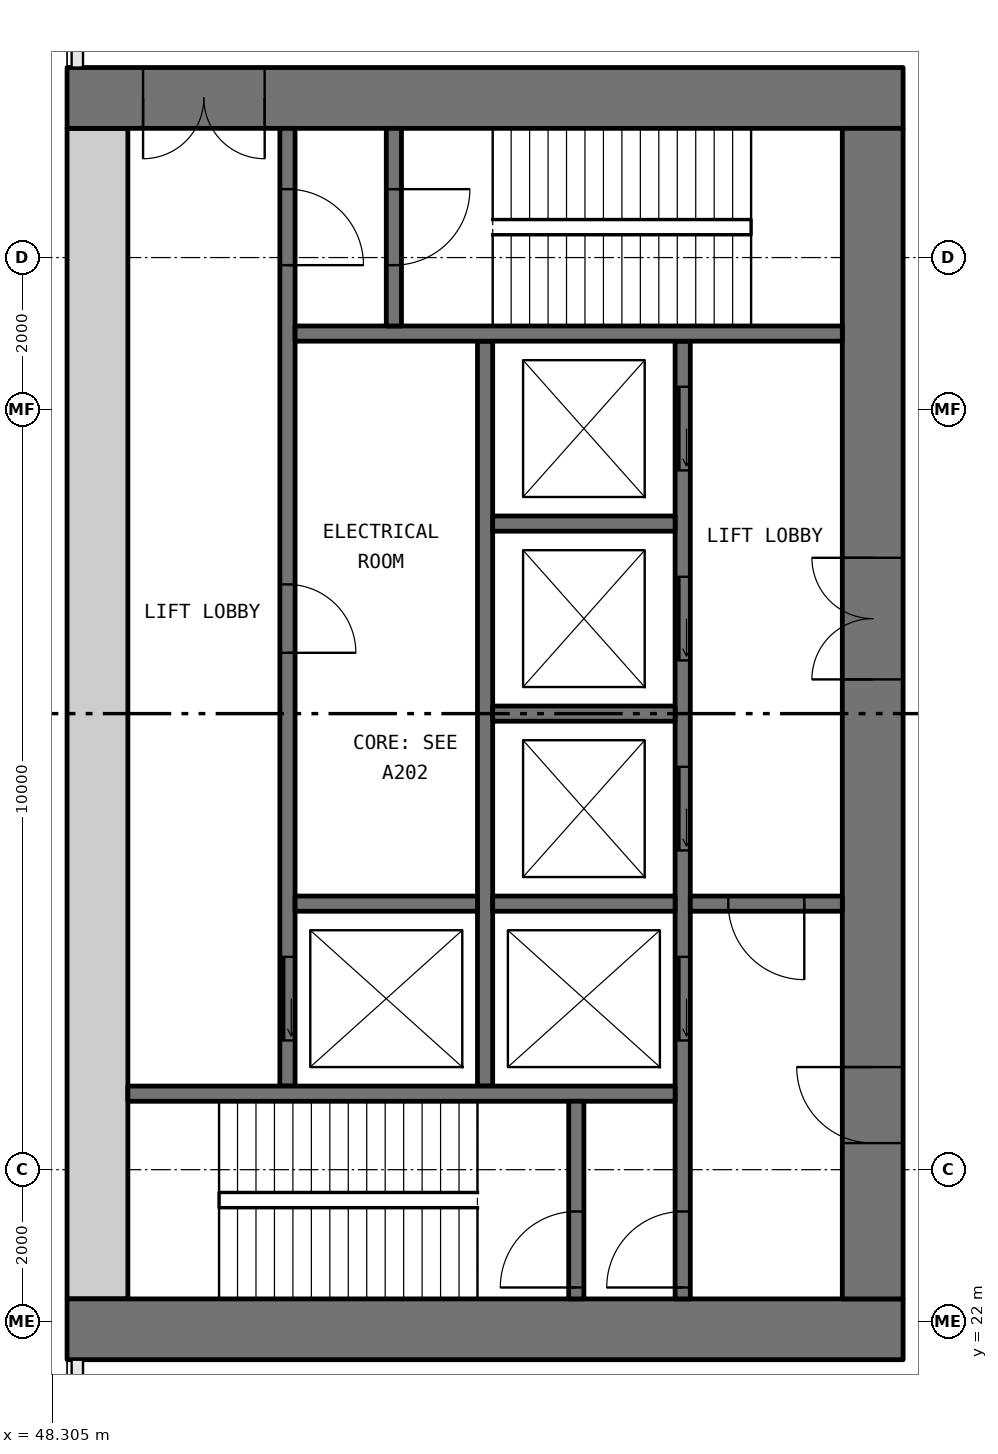
"""IFC4 building model, lengths in metres.
Left out: names, types, materials, properties, quantities, classifications, styles, units other than length and angle.
Written with IfcOpenShell. Run it as: python <this file> out.ifc"""

import sys

from ifc_helpers import new_model, si_unit, direction, frame, frame_2d, origin, place, context, subcontext, project, spatial, rectangle, extrude, element, fill, save


model = new_model("IFC4")
c1 = context("Model", 3, precision=1e-05, world=origin(), true_north=direction((0.0, 1.0)))
c2 = subcontext(c1, "Body", "Model", "MODEL_VIEW")
j1 = project(units=[si_unit("LENGTHUNIT", "METRE"), si_unit("PLANEANGLEUNIT", "RADIAN")], contexts=[c1])
p1 = place(None, origin())
s1 = spatial("IfcSite", under=j1, at=p1, CompositionType="ELEMENT")
p2 = place(p1, origin())
s2 = spatial("IfcBuilding", under=s1, at=p2, CompositionType="ELEMENT")
p3 = place(p2, frame((0.0, 0.0, 6.0)))
s3 = spatial("IfcBuildingStorey", under=s2, at=p3, CompositionType="ELEMENT", Elevation=6.0)
p4 = place(p3, frame((59.5, 21.9, 0.0), z_axis=(0.0, 0.0, 1.0), x_axis=(-1.0, 0.0, 0.0)))
e1 = element("IfcWall", 1, at=p4, inside=s3, PredefinedType="SHEAR", context=c2, shape_type="SweptSolid", body=[
    extrude(rectangle(XDim=11.0, YDim=0.8, at=frame_2d((5.5, 0.0))), origin(), (0.0, 0.0, 1.0), 5.6),
])
p5 = place(p3, frame((59.5, 38.1, 0.0), z_axis=(0.0, 0.0, 1.0), x_axis=(-1.0, 0.0, 0.0)))
e2 = element("IfcWall", 2, at=p5, inside=s3, PredefinedType="SHEAR", context=c2, shape_type="SweptSolid", body=[
    extrude(rectangle(XDim=11.0, YDim=0.8, at=frame_2d((5.5, 0.0))), origin(), (0.0, 0.0, 1.0), 5.6),
])
p6 = place(p5, frame((8.4, 0.0, 0.0)))
e3 = element("IfcOpeningElement", 3, at=p6, cuts=e2, PredefinedType="OPENING", context=c2, shape_type="SweptSolid", body=[
    extrude(rectangle(XDim=1.6, YDim=2.1, at=frame_2d((0.8, 1.05))), frame((0.0, 0.41, 0.0), z_axis=(0.0, -1.0, 0.0), x_axis=(1.0, 0.0, 0.0)), (0.0, 0.0, 1.0), 0.82),
])
p7 = place(p3, frame((59.1, 22.3, 0.0), z_axis=(0.0, 0.0, 1.0), x_axis=(0.0, 1.0, 0.0)))
e4 = element("IfcWall", 4, at=p7, inside=s3, PredefinedType="SHEAR", context=c2, shape_type="SweptSolid", body=[
    extrude(rectangle(XDim=15.4, YDim=0.8, at=frame_2d((7.7, 0.0))), origin(), (0.0, 0.0, 1.0), 5.6),
])
p8 = place(p7, frame((8.15, 0.0, 0.0)))
e5 = element("IfcOpeningElement", 5, at=p8, cuts=e4, PredefinedType="OPENING", context=c2, shape_type="SweptSolid", body=[
    extrude(rectangle(XDim=1.6, YDim=2.1, at=frame_2d((0.8, 1.05))), frame((0.0, 0.41, 0.0), z_axis=(0.0, -1.0, 0.0), x_axis=(1.0, 0.0, 0.0)), (0.0, 0.0, 1.0), 0.82),
])
p9 = place(p7, frame((2.05, 0.0, 0.0)))
e6 = element("IfcOpeningElement", 6, at=p9, cuts=e4, PredefinedType="OPENING", context=c2, shape_type="SweptSolid", body=[
    extrude(rectangle(XDim=1.0, YDim=2.1, at=frame_2d((0.5, 1.05))), frame((0.0, 0.41, 0.0), z_axis=(0.0, -1.0, 0.0), x_axis=(1.0, 0.0, 0.0)), (0.0, 0.0, 1.0), 0.82),
])
p10 = place(p3, frame((48.9, 22.3, 0.0), z_axis=(0.0, 0.0, 1.0), x_axis=(0.0, 1.0, 0.0)))
e7 = element("IfcWall", 7, at=p10, inside=s3, PredefinedType="SHEAR", context=c2, shape_type="SweptSolid", body=[
    extrude(rectangle(XDim=15.4, YDim=0.8, at=frame_2d((7.7, 0.0))), origin(), (0.0, 0.0, 1.0), 5.6),
])
p11 = place(p3, frame((56.6, 22.3, 0.0), z_axis=(0.0, 0.0, 1.0), x_axis=(0.0, 1.0, 0.0)))
e8 = element("IfcWall", 8, at=p11, inside=s3, PredefinedType="SOLIDWALL", context=c2, shape_type="SweptSolid", body=[
    extrude(rectangle(XDim=12.6, YDim=0.2, at=frame_2d((6.3, 0.0))), origin(), (0.0, 0.0, 1.0), 5.6),
])
p12 = place(p11, frame((3.4, 0.0, 0.0)))
e9 = element("IfcOpeningElement", 9, at=p12, cuts=e8, PredefinedType="OPENING", context=c2, shape_type="SweptSolid", body=[
    extrude(rectangle(XDim=1.1, YDim=2.1, at=frame_2d((0.55, 1.05))), frame((0.0, 0.11, 0.0), z_axis=(0.0, -1.0, 0.0), x_axis=(1.0, 0.0, 0.0)), (0.0, 0.0, 1.0), 0.22),
])
p13 = place(p11, frame((5.9, 0.0, 0.0)))
e10 = element("IfcOpeningElement", 10, at=p13, cuts=e8, PredefinedType="OPENING", context=c2, shape_type="SweptSolid", body=[
    extrude(rectangle(XDim=1.1, YDim=2.1, at=frame_2d((0.55, 1.05))), frame((0.0, 0.11, 0.0), z_axis=(0.0, -1.0, 0.0), x_axis=(1.0, 0.0, 0.0)), (0.0, 0.0, 1.0), 0.22),
])
p14 = place(p11, frame((8.4, 0.0, 0.0)))
e11 = element("IfcOpeningElement", 11, at=p14, cuts=e8, PredefinedType="OPENING", context=c2, shape_type="SweptSolid", body=[
    extrude(rectangle(XDim=1.1, YDim=2.1, at=frame_2d((0.55, 1.05))), frame((0.0, 0.11, 0.0), z_axis=(0.0, -1.0, 0.0), x_axis=(1.0, 0.0, 0.0)), (0.0, 0.0, 1.0), 0.22),
])
p15 = place(p11, frame((10.9, 0.0, 0.0)))
e12 = element("IfcOpeningElement", 12, at=p15, cuts=e8, PredefinedType="OPENING", context=c2, shape_type="SweptSolid", body=[
    extrude(rectangle(XDim=1.1, YDim=2.1, at=frame_2d((0.55, 1.05))), frame((0.0, 0.11, 0.0), z_axis=(0.0, -1.0, 0.0), x_axis=(1.0, 0.0, 0.0)), (0.0, 0.0, 1.0), 0.22),
])
p16 = place(p11, frame((0.15, 0.0, 0.0)))
e13 = element("IfcOpeningElement", 13, at=p16, cuts=e8, PredefinedType="OPENING", context=c2, shape_type="SweptSolid", body=[
    extrude(rectangle(XDim=1.0, YDim=2.1, at=frame_2d((0.5, 1.05))), frame((0.0, 0.11, 0.0), z_axis=(0.0, -1.0, 0.0), x_axis=(1.0, 0.0, 0.0)), (0.0, 0.0, 1.0), 0.22),
])
p17 = place(p3, frame((51.4, 25.1, 0.0), z_axis=(0.0, 0.0, 1.0), x_axis=(0.0, 1.0, 0.0)))
e14 = element("IfcWall", 14, at=p17, inside=s3, PredefinedType="SOLIDWALL", context=c2, shape_type="SweptSolid", body=[
    extrude(rectangle(XDim=12.6, YDim=0.2, at=frame_2d((6.3, 0.0))), origin(), (0.0, 0.0, 1.0), 5.6),
])
p18 = place(p17, frame((0.6, 0.0, 0.0)))
e15 = element("IfcOpeningElement", 15, at=p18, cuts=e14, PredefinedType="OPENING", context=c2, shape_type="SweptSolid", body=[
    extrude(rectangle(XDim=1.1, YDim=2.1, at=frame_2d((0.55, 1.05))), frame((0.0, 0.11, 0.0), z_axis=(0.0, -1.0, 0.0), x_axis=(1.0, 0.0, 0.0)), (0.0, 0.0, 1.0), 0.22),
])
p19 = place(p17, frame((10.8, 0.0, 0.0)))
e16 = element("IfcOpeningElement", 16, at=p19, cuts=e14, PredefinedType="OPENING", context=c2, shape_type="SweptSolid", body=[
    extrude(rectangle(XDim=1.0, YDim=2.1, at=frame_2d((0.5, 1.05))), frame((0.0, 0.11, 0.0), z_axis=(0.0, -1.0, 0.0), x_axis=(1.0, 0.0, 0.0)), (0.0, 0.0, 1.0), 0.22),
])
p20 = place(p17, frame((5.7, 0.0, 0.0)))
e17 = element("IfcOpeningElement", 17, at=p20, cuts=e14, PredefinedType="OPENING", context=c2, shape_type="SweptSolid", body=[
    extrude(rectangle(XDim=0.9, YDim=2.1, at=frame_2d((0.45, 1.05))), frame((0.0, 0.11, 0.0), z_axis=(0.0, -1.0, 0.0), x_axis=(1.0, 0.0, 0.0)), (0.0, 0.0, 1.0), 0.22),
])
p21 = place(p3, frame((54.0, 25.1, 0.0), z_axis=(0.0, 0.0, 1.0), x_axis=(0.0, 1.0, 0.0)))
e18 = element("IfcWall", 18, at=p21, inside=s3, PredefinedType="SOLIDWALL", context=c2, shape_type="SweptSolid", body=[
    extrude(rectangle(XDim=9.8, YDim=0.2, at=frame_2d((4.9, 0.0))), origin(), (0.0, 0.0, 1.0), 5.6),
])
for number, where, z_axis, x_axis in (
    (19, (56.5, 25.0, 0.0), (0.0, 0.0, 1.0), (-1.0, 0.0, 0.0)),
    (20, (58.7, 35.0, 0.0), (0.0, 0.0, 1.0), (-1.0, 0.0, 0.0)),
):
    element("IfcWall", number, at=place(p3, frame(where, z_axis=z_axis, x_axis=x_axis)), inside=s3, PredefinedType="SOLIDWALL", context=c2, shape_type="SweptSolid", body=[
        extrude(rectangle(XDim=7.2, YDim=0.2, at=frame_2d((3.6, 0.0))), origin(), (0.0, 0.0, 1.0), 5.6),
    ])
p22 = place(p3, frame((58.7, 27.5, 0.0), z_axis=(0.0, 0.0, 1.0), x_axis=(-1.0, 0.0, 0.0)))
e21 = element("IfcWall", 21, at=p22, inside=s3, PredefinedType="SOLIDWALL", context=c2, shape_type="SweptSolid", body=[
    extrude(rectangle(XDim=2.0, YDim=0.2, at=frame_2d((1.0, 0.0))), origin(), (0.0, 0.0, 1.0), 5.6),
])
p23 = place(p22, frame((0.5, 0.0, 0.0)))
e22 = element("IfcOpeningElement", 22, at=p23, cuts=e21, PredefinedType="OPENING", context=c2, shape_type="SweptSolid", body=[
    extrude(rectangle(XDim=1.0, YDim=2.1, at=frame_2d((0.5, 1.05))), frame((0.0, 0.11, 0.0), z_axis=(0.0, -1.0, 0.0), x_axis=(1.0, 0.0, 0.0)), (0.0, 0.0, 1.0), 0.22),
])
p24 = place(p3, frame((55.2, 22.3, 0.0), z_axis=(0.0, 0.0, 1.0), x_axis=(0.0, 1.0, 0.0)))
e23 = element("IfcWall", 23, at=p24, inside=s3, PredefinedType="SOLIDWALL", context=c2, shape_type="SweptSolid", body=[
    extrude(rectangle(XDim=2.6, YDim=0.2, at=frame_2d((1.3, 0.0))), origin(), (0.0, 0.0, 1.0), 5.6),
])
p25 = place(p24, frame((0.15, 0.0, 0.0)))
e24 = element("IfcOpeningElement", 24, at=p25, cuts=e23, PredefinedType="OPENING", context=c2, shape_type="SweptSolid", body=[
    extrude(rectangle(XDim=1.0, YDim=2.1, at=frame_2d((0.5, 1.05))), frame((0.0, 0.11, 0.0), z_axis=(0.0, -1.0, 0.0), x_axis=(1.0, 0.0, 0.0)), (0.0, 0.0, 1.0), 0.22),
])
p26 = place(p3, frame((52.8, 35.1, 0.0), z_axis=(0.0, 0.0, 1.0), x_axis=(0.0, 1.0, 0.0)))
e25 = element("IfcWall", 25, at=p26, inside=s3, PredefinedType="SOLIDWALL", context=c2, shape_type="SweptSolid", body=[
    extrude(rectangle(XDim=2.6, YDim=0.2, at=frame_2d((1.3, 0.0))), origin(), (0.0, 0.0, 1.0), 5.6),
])
p27 = place(p26, frame((0.8, 0.0, 0.0)))
e26 = element("IfcOpeningElement", 26, at=p27, cuts=e25, PredefinedType="OPENING", context=c2, shape_type="SweptSolid", body=[
    extrude(rectangle(XDim=1.0, YDim=2.1, at=frame_2d((0.5, 1.05))), frame((0.0, 0.11, 0.0), z_axis=(0.0, -1.0, 0.0), x_axis=(1.0, 0.0, 0.0)), (0.0, 0.0, 1.0), 0.22),
])
for number, where, z_axis, x_axis in (
    (27, (56.5, 27.5, 0.0), (0.0, 0.0, 1.0), (-1.0, 0.0, 0.0)),
    (28, (56.5, 30.0, 0.0), (0.0, 0.0, 1.0), (-1.0, 0.0, 0.0)),
    (29, (56.5, 32.5, 0.0), (0.0, 0.0, 1.0), (-1.0, 0.0, 0.0)),
    (30, (53.9, 27.5, 0.0), (0.0, 0.0, 1.0), (-1.0, 0.0, 0.0)),
):
    element("IfcWall", number, at=place(p3, frame(where, z_axis=z_axis, x_axis=x_axis)), inside=s3, PredefinedType="SOLIDWALL", context=c2, shape_type="SweptSolid", body=[
        extrude(rectangle(XDim=2.4, YDim=0.2, at=frame_2d((1.2, 0.0))), origin(), (0.0, 0.0, 1.0), 5.6),
    ])
p28 = place(p18, origin())
e31 = element("IfcDoor", 31, at=p28, inside=s3, OperationType="SLIDING_TO_LEFT", PredefinedType="DOOR", context=c2, shape_type="SweptSolid", body=[
    extrude(rectangle(XDim=1.1, YDim=2.1, at=frame_2d((0.55, 1.05))), frame((0.0, 0.025, 0.0), z_axis=(0.0, -1.0, 0.0), x_axis=(1.0, 0.0, 0.0)), (0.0, 0.0, 1.0), 0.05),
])
fill(e15, e31)
p29 = place(p12, origin())
e32 = element("IfcDoor", 32, at=p29, inside=s3, OperationType="SLIDING_TO_LEFT", PredefinedType="DOOR", context=c2, shape_type="SweptSolid", body=[
    extrude(rectangle(XDim=1.1, YDim=2.1, at=frame_2d((0.55, 1.05))), frame((0.0, 0.025, 0.0), z_axis=(0.0, -1.0, 0.0), x_axis=(1.0, 0.0, 0.0)), (0.0, 0.0, 1.0), 0.05),
])
fill(e9, e32)
p30 = place(p13, origin())
e33 = element("IfcDoor", 33, at=p30, inside=s3, OperationType="SLIDING_TO_LEFT", PredefinedType="DOOR", context=c2, shape_type="SweptSolid", body=[
    extrude(rectangle(XDim=1.1, YDim=2.1, at=frame_2d((0.55, 1.05))), frame((0.0, 0.025, 0.0), z_axis=(0.0, -1.0, 0.0), x_axis=(1.0, 0.0, 0.0)), (0.0, 0.0, 1.0), 0.05),
])
fill(e10, e33)
p31 = place(p14, origin())
e34 = element("IfcDoor", 34, at=p31, inside=s3, OperationType="SLIDING_TO_LEFT", PredefinedType="DOOR", context=c2, shape_type="SweptSolid", body=[
    extrude(rectangle(XDim=1.1, YDim=2.1, at=frame_2d((0.55, 1.05))), frame((0.0, 0.025, 0.0), z_axis=(0.0, -1.0, 0.0), x_axis=(1.0, 0.0, 0.0)), (0.0, 0.0, 1.0), 0.05),
])
fill(e11, e34)
p32 = place(p15, origin())
e35 = element("IfcDoor", 35, at=p32, inside=s3, OperationType="SLIDING_TO_LEFT", PredefinedType="DOOR", context=c2, shape_type="SweptSolid", body=[
    extrude(rectangle(XDim=1.1, YDim=2.1, at=frame_2d((0.55, 1.05))), frame((0.0, 0.025, 0.0), z_axis=(0.0, -1.0, 0.0), x_axis=(1.0, 0.0, 0.0)), (0.0, 0.0, 1.0), 0.05),
])
fill(e12, e35)
p33 = place(p25, origin())
e36 = element("IfcDoor", 36, at=p33, inside=s3, OperationType="SINGLE_SWING_RIGHT", PredefinedType="DOOR", context=c2, shape_type="SweptSolid", body=[
    extrude(rectangle(XDim=1.0, YDim=2.1, at=frame_2d((0.5, 1.05))), frame((0.0, 0.025, 0.0), z_axis=(0.0, -1.0, 0.0), x_axis=(1.0, 0.0, 0.0)), (0.0, 0.0, 1.0), 0.05),
])
fill(e24, e36)
p34 = place(p16, origin())
e37 = element("IfcDoor", 37, at=p34, inside=s3, OperationType="SINGLE_SWING_RIGHT", PredefinedType="DOOR", context=c2, shape_type="SweptSolid", body=[
    extrude(rectangle(XDim=1.0, YDim=2.1, at=frame_2d((0.5, 1.05))), frame((0.0, 0.025, 0.0), z_axis=(0.0, -1.0, 0.0), x_axis=(1.0, 0.0, 0.0)), (0.0, 0.0, 1.0), 0.05),
])
fill(e13, e37)
p35 = place(p19, frame((1.0, 0.0, 0.0), x_axis=(-1.0, 0.0, 0.0)))
e38 = element("IfcDoor", 38, at=p35, inside=s3, OperationType="SINGLE_SWING_LEFT", PredefinedType="DOOR", context=c2, shape_type="SweptSolid", body=[
    extrude(rectangle(XDim=1.0, YDim=2.1, at=frame_2d((0.5, 1.05))), frame((0.0, 0.025, 0.0), z_axis=(0.0, -1.0, 0.0), x_axis=(1.0, 0.0, 0.0)), (0.0, 0.0, 1.0), 0.05),
])
fill(e16, e38)
p36 = place(p27, frame((1.0, 0.0, 0.0), x_axis=(-1.0, 0.0, 0.0)))
e39 = element("IfcDoor", 39, at=p36, inside=s3, OperationType="SINGLE_SWING_RIGHT", PredefinedType="DOOR", context=c2, shape_type="SweptSolid", body=[
    extrude(rectangle(XDim=1.0, YDim=2.1, at=frame_2d((0.5, 1.05))), frame((0.0, 0.025, 0.0), z_axis=(0.0, -1.0, 0.0), x_axis=(1.0, 0.0, 0.0)), (0.0, 0.0, 1.0), 0.05),
])
fill(e26, e39)
p37 = place(p23, origin())
e40 = element("IfcDoor", 40, at=p37, inside=s3, OperationType="SINGLE_SWING_RIGHT", PredefinedType="DOOR", context=c2, shape_type="SweptSolid", body=[
    extrude(rectangle(XDim=1.0, YDim=2.1, at=frame_2d((0.5, 1.05))), frame((0.0, 0.025, 0.0), z_axis=(0.0, -1.0, 0.0), x_axis=(1.0, 0.0, 0.0)), (0.0, 0.0, 1.0), 0.05),
])
fill(e22, e40)
p38 = place(p8, origin())
e41 = element("IfcDoor", 41, at=p38, inside=s3, OperationType="DOUBLE_DOOR_SINGLE_SWING", PredefinedType="DOOR", context=c2, shape_type="SweptSolid", body=[
    extrude(rectangle(XDim=1.6, YDim=2.1, at=frame_2d((0.8, 1.05))), frame((0.0, 0.025, 0.0), z_axis=(0.0, -1.0, 0.0), x_axis=(1.0, 0.0, 0.0)), (0.0, 0.0, 1.0), 0.05),
])
fill(e5, e41)
p39 = place(p9, origin())
e42 = element("IfcDoor", 42, at=p39, inside=s3, OperationType="SINGLE_SWING_LEFT", PredefinedType="DOOR", context=c2, shape_type="SweptSolid", body=[
    extrude(rectangle(XDim=1.0, YDim=2.1, at=frame_2d((0.5, 1.05))), frame((0.0, 0.025, 0.0), z_axis=(0.0, -1.0, 0.0), x_axis=(1.0, 0.0, 0.0)), (0.0, 0.0, 1.0), 0.05),
])
fill(e6, e42)
p40 = place(p6, origin())
e43 = element("IfcDoor", 43, at=p40, inside=s3, OperationType="DOUBLE_DOOR_SINGLE_SWING", PredefinedType="DOOR", context=c2, shape_type="SweptSolid", body=[
    extrude(rectangle(XDim=1.6, YDim=2.1, at=frame_2d((0.8, 1.05))), frame((0.0, 0.025, 0.0), z_axis=(0.0, -1.0, 0.0), x_axis=(1.0, 0.0, 0.0)), (0.0, 0.0, 1.0), 0.05),
])
fill(e3, e43)
p41 = place(p20, frame((0.9, 0.0, 0.0), x_axis=(-1.0, 0.0, 0.0)))
e44 = element("IfcDoor", 44, at=p41, inside=s3, OperationType="SINGLE_SWING_LEFT", PredefinedType="DOOR", context=c2, shape_type="SweptSolid", body=[
    extrude(rectangle(XDim=0.9, YDim=2.1, at=frame_2d((0.45, 1.05))), frame((0.0, 0.025, 0.0), z_axis=(0.0, -1.0, 0.0), x_axis=(1.0, 0.0, 0.0)), (0.0, 0.0, 1.0), 0.05),
])
fill(e17, e44)
save(model, sys.argv[1])
